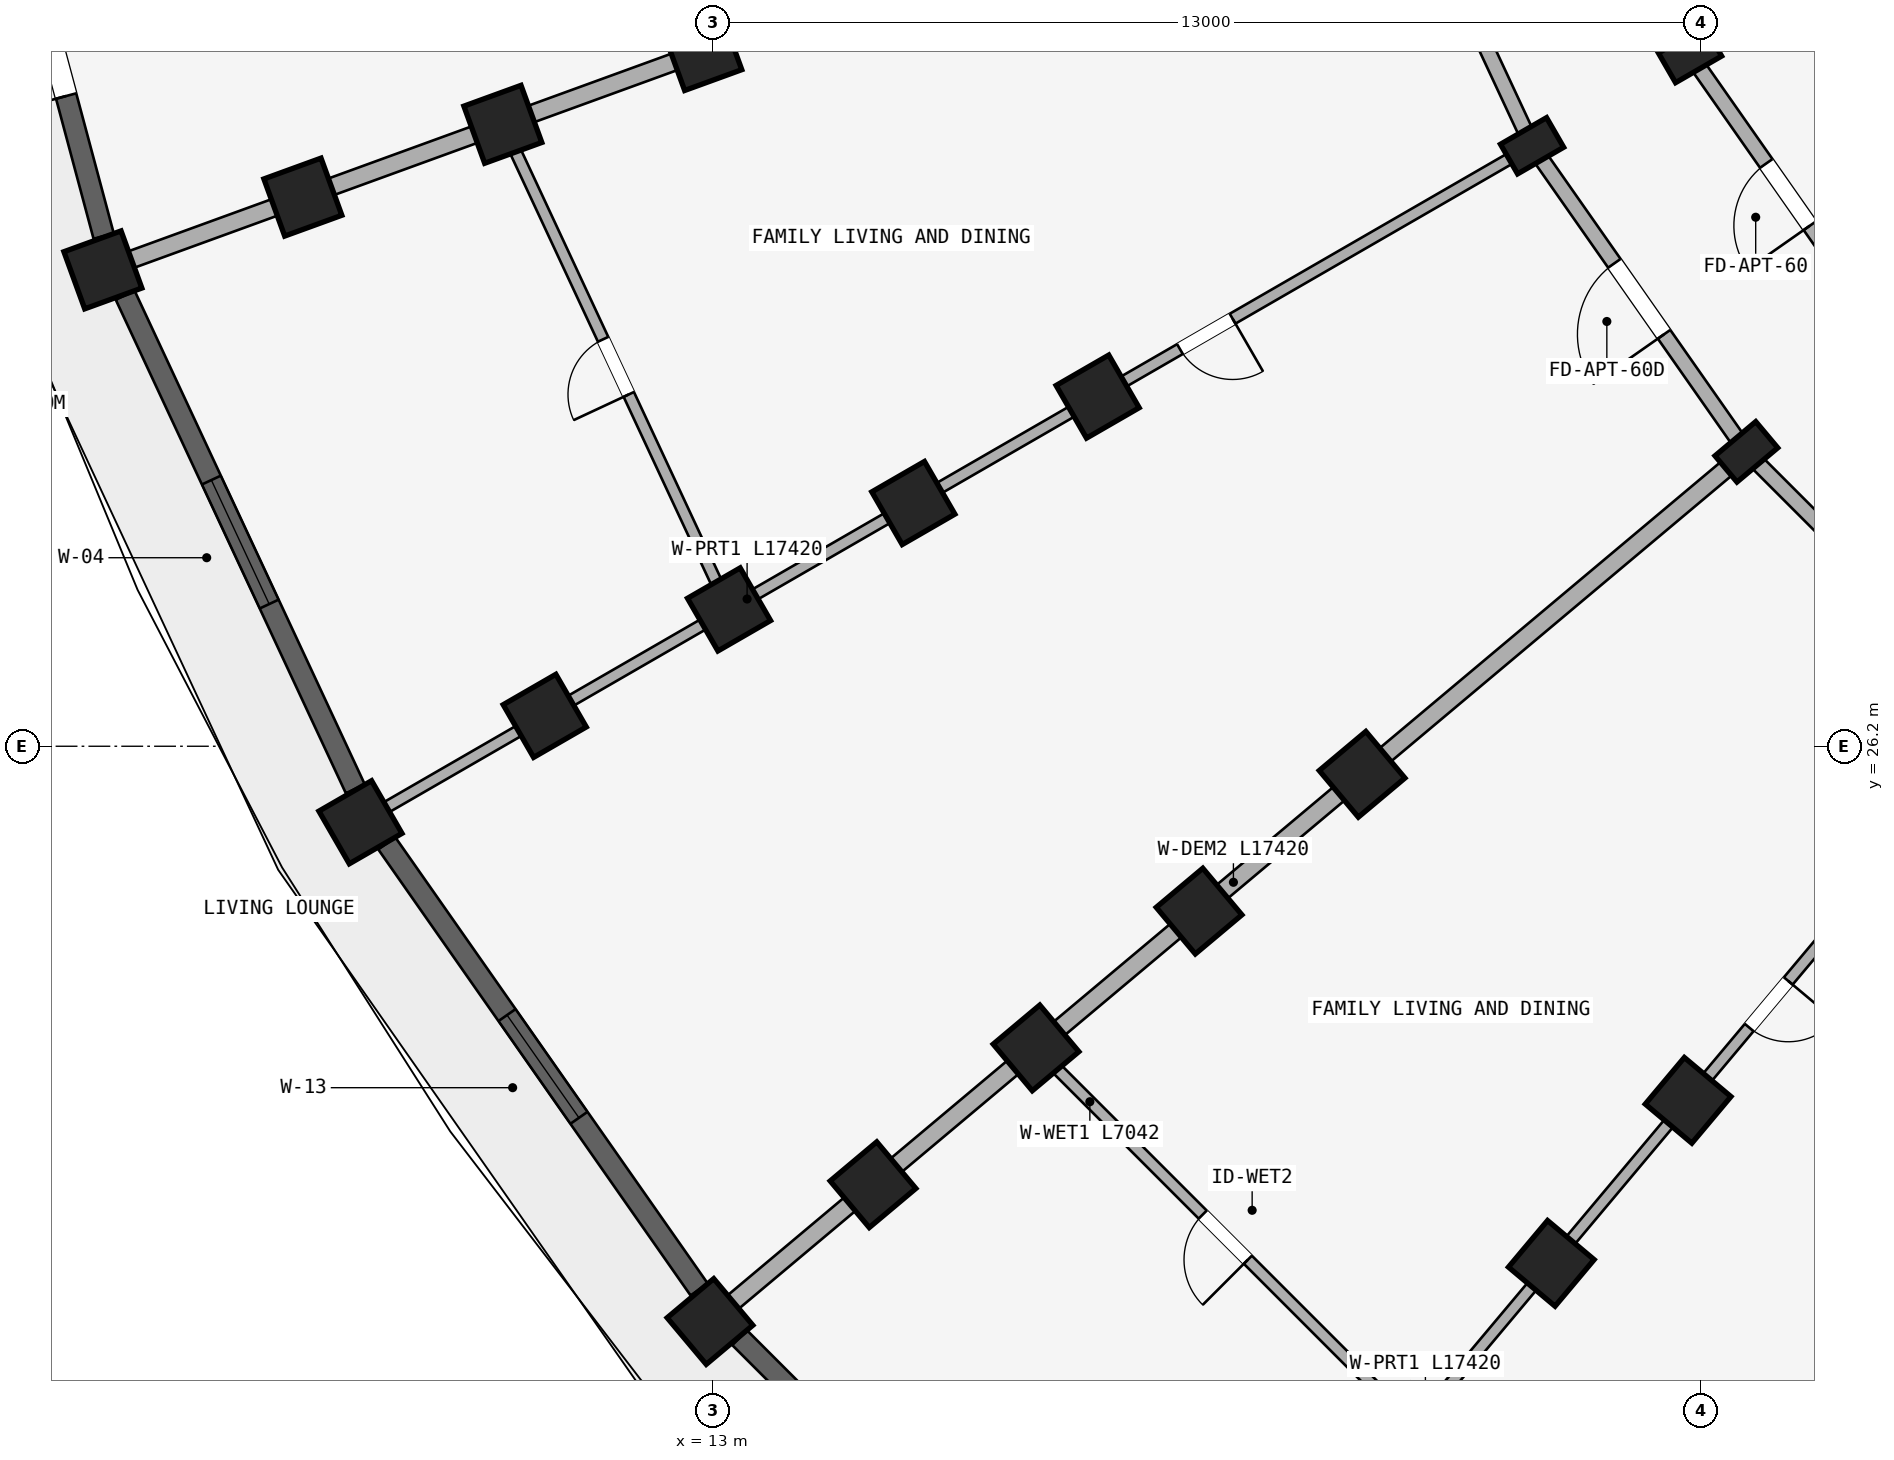
"""IFC4 building model, lengths in metres.
Left out: names, types, materials, properties, quantities, classifications, styles, units other than length and angle.
Written with IfcOpenShell. Run it as: python <this file> out.ifc"""

import sys

from ifc_helpers import new_model, si_unit, direction, frame, frame_2d, origin, origin_2d, place, context, subcontext, project, spatial, rectangle, extrude, element, fill, save


model = new_model("IFC4")
c1 = context("Model", 3, precision=1e-05, world=origin(), true_north=direction((0.0, 1.0)))
c2 = subcontext(c1, "Body", "Model", "MODEL_VIEW")
j1 = project(units=[si_unit("LENGTHUNIT", "METRE"), si_unit("PLANEANGLEUNIT", "RADIAN")], contexts=[c1])
p1 = place(None, origin())
s1 = spatial("IfcSite", under=j1, at=p1, CompositionType="ELEMENT")
p2 = place(p1, origin())
s2 = spatial("IfcBuilding", under=s1, at=p2, CompositionType="ELEMENT")
p3 = place(p2, frame((0.0, 0.0, 11.85)))
s3 = spatial("IfcBuildingStorey", under=s2, at=p3, CompositionType="ELEMENT", Elevation=11.85)
for number, where, z_axis, x_axis in (
    (1, (25.831, 21.542, 0.0), (0.0, 0.0, 1.0), (-0.766, 0.643, 0.0)),
    (2, (24.031, 19.397, 0.0), (0.0, 0.0, 1.0), (-0.766, 0.643, 0.0)),
):
    element("IfcColumn", number, at=place(p3, frame(where, z_axis=z_axis, x_axis=x_axis)), inside=s3, PredefinedType="COLUMN", context=c2, shape_type="SweptSolid", body=[
        extrude(rectangle(XDim=0.8, YDim=0.8, at=origin_2d()), origin(), (0.0, 0.0, 1.0), 2.93),
    ])
p4 = place(p3, frame((26.598, 30.073, 0.0), z_axis=(0.0, 0.0, 1.0), x_axis=(-0.642787609687, 0.766044443119, 0.0)))
e3 = element("IfcColumn", 3, at=p4, inside=s3, PredefinedType="COLUMN", context=c2, shape_type="SweptSolid", body=[
    extrude(rectangle(XDim=0.45, YDim=0.7, at=origin_2d()), origin(), (0.0, 0.0, 1.0), 2.93),
])
for number, where, z_axis, x_axis in (
    (4, (21.542, 25.831, 0.0), (0.0, 0.0, 1.0), (-0.643, 0.766, 0.0)),
    (5, (19.397, 24.031, 0.0), (0.0, 0.0, 1.0), (-0.643, 0.766, 0.0)),
    (6, (17.252, 22.231, 0.0), (0.0, 0.0, 1.0), (-0.643, 0.766, 0.0)),
    (7, (15.107, 20.432, 0.0), (0.0, 0.0, 1.0), (-0.643, 0.766, 0.0)),
    (8, (12.962, 18.632, 0.0), (0.0, 0.0, 1.0), (-0.643, 0.766, 0.0)),
):
    element("IfcColumn", number, at=place(p3, frame(where, z_axis=z_axis, x_axis=x_axis)), inside=s3, PredefinedType="COLUMN", context=c2, shape_type="SweptSolid", body=[
        extrude(rectangle(XDim=0.8, YDim=0.8, at=origin_2d()), origin(), (0.0, 0.0, 1.0), 2.93),
    ])
for number, where, z_axis, x_axis in (
    (9, (25.856, 35.3, 0.0), (0.0, 0.0, 1.0), (-0.5, 0.866, 0.0)),
    (10, (23.778, 34.1, 0.0), (0.0, 0.0, 1.0), (-0.5, 0.866, 0.0)),
):
    element("IfcColumn", number, at=place(p3, frame(where, z_axis=z_axis, x_axis=x_axis)), inside=s3, PredefinedType="COLUMN", context=c2, shape_type="SweptSolid", body=[
        extrude(rectangle(XDim=0.45, YDim=0.7, at=origin_2d()), origin(), (0.0, 0.0, 1.0), 2.93),
    ])
for number, where, z_axis, x_axis in (
    (11, (18.062, 30.8, 0.0), (0.0, 0.0, 1.0), (-0.5, 0.866, 0.0)),
    (12, (15.637, 29.4, 0.0), (0.0, 0.0, 1.0), (-0.5, 0.866, 0.0)),
    (13, (13.213, 28.0, 0.0), (0.0, 0.0, 1.0), (-0.5, 0.866, 0.0)),
    (14, (10.788, 26.6, 0.0), (0.0, 0.0, 1.0), (-0.5, 0.866, 0.0)),
    (15, (8.363, 25.2, 0.0), (0.0, 0.0, 1.0), (-0.5, 0.866, 0.0)),
    (16, (12.868, 35.34, 0.0), (0.0, 0.0, 1.0), (-0.342, 0.94, 0.0)),
    (17, (10.236, 34.382, 0.0), (0.0, 0.0, 1.0), (-0.342, 0.94, 0.0)),
    (18, (7.605, 33.425, 0.0), (0.0, 0.0, 1.0), (-0.342, 0.94, 0.0)),
    (19, (4.974, 32.467, 0.0), (0.0, 0.0, 1.0), (-0.342, 0.94, 0.0)),
):
    element("IfcColumn", number, at=place(p3, frame(where, z_axis=z_axis, x_axis=x_axis)), inside=s3, PredefinedType="COLUMN", context=c2, shape_type="SweptSolid", body=[
        extrude(rectangle(XDim=0.8, YDim=0.8, at=origin_2d()), origin(), (0.0, 0.0, 1.0), 2.93),
    ])
p5 = place(p3, frame((30.073, 26.598, 0.0), z_axis=(0.0, 0.0, 1.0), x_axis=(-0.707106781187, 0.707106781187, 0.0)))
e20 = element("IfcWall", 20, at=p5, inside=s3, PredefinedType="STANDARD", context=c2, shape_type="SweptSolid", body=[
    extrude(rectangle(XDim=4.916, YDim=0.2, at=frame_2d((2.458, 0.0))), origin(), (0.0, 0.0, 1.0), 2.372),
])
p6 = place(p3, frame((28.436, 31.616, 0.0), z_axis=(0.0, 0.0, 1.0), x_axis=(-0.573571637217, 0.819155404658, 0.0)))
e21 = element("IfcWall", 21, at=p6, inside=s3, PredefinedType="STANDARD", context=c2, shape_type="SweptSolid", body=[
    extrude(rectangle(XDim=4.497, YDim=0.2, at=frame_2d((2.249, 0.0))), origin(), (0.0, 0.0, 1.0), 2.372),
])
p7 = place(p6, frame((1.749, 0.0, 0.0)))
e22 = element("IfcOpeningElement", 22, at=p7, cuts=e21, PredefinedType="OPENING", context=c2, shape_type="SweptSolid", body=[
    extrude(rectangle(XDim=1.0, YDim=2.15, at=frame_2d((0.5, 1.075))), frame((0.0, 0.11, 0.0), z_axis=(0.0, -1.0, 0.0), x_axis=(1.0, 0.0, 0.0)), (0.0, 0.0, 1.0), 0.22),
])
p8 = place(p3, frame((26.598, 30.073, 0.0), z_axis=(0.0, 0.0, 1.0), x_axis=(-0.573592335331, 0.819140911474, 0.0)))
e23 = element("IfcWall", 23, at=p8, inside=s3, PredefinedType="STANDARD", context=c2, shape_type="SweptSolid", body=[
    extrude(rectangle(XDim=4.916, YDim=0.2, at=frame_2d((2.458, 0.0))), origin(), (0.0, 0.0, 1.0), 2.372),
])
p9 = place(p8, frame((1.888, 0.0, 0.0)))
e24 = element("IfcOpeningElement", 24, at=p9, cuts=e23, PredefinedType="OPENING", context=c2, shape_type="SweptSolid", body=[
    extrude(rectangle(XDim=1.14, YDim=2.15, at=frame_2d((0.57, 1.075))), frame((0.0, 0.11, 0.0), z_axis=(0.0, -1.0, 0.0), x_axis=(1.0, 0.0, 0.0)), (0.0, 0.0, 1.0), 0.22),
])
p10 = place(p3, frame((25.856, 35.3, 0.0), z_axis=(0.0, 0.0, 1.0), x_axis=(-0.422617978463, 0.906307919131, 0.0)))
e25 = element("IfcWall", 25, at=p10, inside=s3, PredefinedType="STANDARD", context=c2, shape_type="SweptSolid", body=[
    extrude(rectangle(XDim=4.497, YDim=0.2, at=frame_2d((2.249, 0.0))), origin(), (0.0, 0.0, 1.0), 2.372),
])
p11 = place(p3, frame((23.778, 34.1, 0.0), z_axis=(0.0, 0.0, 1.0), x_axis=(-0.422629854778, 0.906302381024, 0.0)))
e26 = element("IfcWall", 26, at=p11, inside=s3, PredefinedType="STANDARD", context=c2, shape_type="SweptSolid", body=[
    extrude(rectangle(XDim=4.915, YDim=0.2, at=frame_2d((2.458, 0.0))), origin(), (0.0, 0.0, 1.0), 2.372),
])
p12 = place(p3, frame((34.05, 23.691, 0.0), z_axis=(0.0, 0.0, 1.0), x_axis=(-0.499997843263, -0.866026648973, 0.0)))
e27 = element("IfcWall", 27, at=p12, inside=s3, PredefinedType="STANDARD", context=c2, shape_type="SweptSolid", body=[
    extrude(rectangle(XDim=17.42, YDim=0.23, at=frame_2d((8.71, 0.0))), origin(), (0.0, 0.0, 1.0), 2.372),
])
p13 = place(p3, frame((30.009, 26.521, 0.0), z_axis=(0.0, 0.0, 1.0), x_axis=(-0.642784757967, -0.766046835987, 0.0)))
e28 = element("IfcWall", 28, at=p13, inside=s3, PredefinedType="PARTITIONING", context=c2, shape_type="SweptSolid", body=[
    extrude(rectangle(XDim=17.42, YDim=0.15, at=frame_2d((8.71, 0.0))), origin(), (0.0, 0.0, 1.0), 2.372),
])
p14 = place(p13, frame((4.45, 0.0, 0.0)))
e29 = element("IfcOpeningElement", 29, at=p14, cuts=e28, PredefinedType="OPENING", context=c2, shape_type="SweptSolid", body=[
    extrude(rectangle(XDim=0.8, YDim=2.1, at=frame_2d((0.4, 1.05))), frame((0.0, 0.085, 0.0), z_axis=(0.0, -1.0, 0.0), x_axis=(1.0, 0.0, 0.0)), (0.0, 0.0, 1.0), 0.17),
])
p15 = place(p3, frame((26.521, 30.009, 0.0), z_axis=(0.0, 0.0, 1.0), x_axis=(-0.766046835987, -0.642784757967, 0.0)))
e30 = element("IfcWall", 30, at=p15, inside=s3, PredefinedType="STANDARD", context=c2, shape_type="SweptSolid", body=[
    extrude(rectangle(XDim=17.42, YDim=0.23, at=frame_2d((8.71, 0.0))), origin(), (0.0, 0.0, 1.0), 2.372),
])
p16 = place(p3, frame((31.746, 38.7, 0.0), z_axis=(0.0, 0.0, 1.0), x_axis=(-0.866026575979, -0.499997969693, 0.0)))
e31 = element("IfcWall", 31, at=p16, inside=s3, PredefinedType="PARTITIONING", context=c2, shape_type="SweptSolid", body=[
    extrude(rectangle(XDim=6.75, YDim=0.15, at=frame_2d((3.375, 0.0))), origin(), (0.0, 0.0, 1.0), 2.372),
])
p17 = place(p16, frame((3.242, 0.0, 0.0)))
e32 = element("IfcOpeningElement", 32, at=p17, cuts=e31, PredefinedType="OPENING", context=c2, shape_type="SweptSolid", body=[
    extrude(rectangle(XDim=0.94, YDim=2.1, at=frame_2d((0.47, 1.05))), frame((0.0, 0.085, 0.0), z_axis=(0.0, -1.0, 0.0), x_axis=(1.0, 0.0, 0.0)), (0.0, 0.0, 1.0), 0.17),
])
p18 = place(p3, frame((23.691, 34.05, 0.0), z_axis=(0.0, 0.0, 1.0), x_axis=(-0.866026648973, -0.499997843263, 0.0)))
e33 = element("IfcWall", 33, at=p18, inside=s3, PredefinedType="PARTITIONING", context=c2, shape_type="SweptSolid", body=[
    extrude(rectangle(XDim=17.42, YDim=0.15, at=frame_2d((8.71, 0.0))), origin(), (0.0, 0.0, 1.0), 2.372),
])
p19 = place(p18, frame((4.45, 0.0, 0.0)))
e34 = element("IfcOpeningElement", 34, at=p19, cuts=e33, PredefinedType="OPENING", context=c2, shape_type="SweptSolid", body=[
    extrude(rectangle(XDim=0.8, YDim=2.1, at=frame_2d((0.4, 1.05))), frame((0.0, 0.085, 0.0), z_axis=(0.0, -1.0, 0.0), x_axis=(1.0, 0.0, 0.0)), (0.0, 0.0, 1.0), 0.17),
])
p20 = place(p3, frame((21.607, 38.521, 0.0), z_axis=(0.0, 0.0, 1.0), x_axis=(-0.939691901159, -0.342022120477, 0.0)))
e35 = element("IfcWall", 35, at=p20, inside=s3, PredefinedType="STANDARD", context=c2, shape_type="SweptSolid", body=[
    extrude(rectangle(XDim=17.42, YDim=0.23, at=frame_2d((8.71, 0.0))), origin(), (0.0, 0.0, 1.0), 2.372),
])
p21 = place(p3, frame((22.231, 17.252, 0.0), z_axis=(0.0, 0.0, 1.0), x_axis=(-0.707106781187, 0.707106781187, 0.0)))
e36 = element("IfcWall", 36, at=p21, inside=s3, PredefinedType="PLUMBINGWALL", context=c2, shape_type="SweptSolid", body=[
    extrude(rectangle(XDim=7.042, YDim=0.15, at=frame_2d((3.521, 0.0))), origin(), (0.0, 0.0, 1.0), 2.372),
])
p22 = place(p21, frame((3.101, 0.0, 0.0)))
e37 = element("IfcOpeningElement", 37, at=p22, cuts=e36, PredefinedType="OPENING", context=c2, shape_type="SweptSolid", body=[
    extrude(rectangle(XDim=0.84, YDim=2.1, at=frame_2d((0.42, 1.05))), frame((0.0, 0.085, 0.0), z_axis=(0.0, -1.0, 0.0), x_axis=(1.0, 0.0, 0.0)), (0.0, 0.0, 1.0), 0.17),
])
p23 = place(p3, frame((13.213, 28.0, 0.0), z_axis=(0.0, 0.0, 1.0), x_axis=(-0.422640621205, 0.906297360311, 0.0)))
e38 = element("IfcWall", 38, at=p23, inside=s3, PredefinedType="PLUMBINGWALL", context=c2, shape_type="SweptSolid", body=[
    extrude(rectangle(XDim=7.042, YDim=0.15, at=frame_2d((3.521, 0.0))), origin(), (0.0, 0.0, 1.0), 2.372),
])
p24 = place(p23, frame((3.121, 0.0, 0.0)))
e39 = element("IfcOpeningElement", 39, at=p24, cuts=e38, PredefinedType="OPENING", context=c2, shape_type="SweptSolid", body=[
    extrude(rectangle(XDim=0.8, YDim=2.1, at=frame_2d((0.4, 1.05))), frame((0.0, 0.085, 0.0), z_axis=(0.0, -1.0, 0.0), x_axis=(1.0, 0.0, 0.0)), (0.0, 0.0, 1.0), 0.17),
])
p25 = place(p3, frame((18.418, 13.352, 0.0), z_axis=(0.0, 0.0, 1.0), x_axis=(-0.707106781187, 0.707106781187, 0.0)))
e40 = element("IfcWall", 40, at=p25, inside=s3, PredefinedType="STANDARD", context=c2, shape_type="SweptSolid", body=[
    extrude(rectangle(XDim=7.164, YDim=0.275, at=frame_2d((3.582, 0.0))), origin(), (0.0, 0.0, 1.0), 2.372),
])
p26 = place(p25, frame((4.69, 0.0, 0.522)))
e41 = element("IfcOpeningElement", 41, at=p26, cuts=e40, PredefinedType="OPENING", context=c2, shape_type="SweptSolid", body=[
    extrude(rectangle(XDim=1.2, YDim=1.5, at=frame_2d((0.6, 0.75))), frame((0.0, 0.147, 0.0), z_axis=(0.0, -1.0, 0.0), x_axis=(1.0, 0.0, 0.0)), (0.0, 0.0, 1.0), 0.295),
])
p27 = place(p25, frame((1.907, 0.0, 0.0)))
e42 = element("IfcOpeningElement", 42, at=p27, cuts=e40, PredefinedType="OPENING", context=c2, shape_type="SweptSolid", body=[
    extrude(rectangle(XDim=1.2, YDim=2.15, at=frame_2d((0.6, 1.075))), frame((0.0, 0.147, 0.0), z_axis=(0.0, -1.0, 0.0), x_axis=(1.0, 0.0, 0.0)), (0.0, 0.0, 1.0), 0.295),
])
p28 = place(p3, frame((12.819, 19.053, 0.0), z_axis=(0.0, 0.0, 1.0), x_axis=(-0.573562972382, 0.819161471697, 0.0)))
e43 = element("IfcWall", 43, at=p28, inside=s3, PredefinedType="STANDARD", context=c2, shape_type="SweptSolid", body=[
    extrude(rectangle(XDim=7.164, YDim=0.275, at=frame_2d((3.582, 0.0))), origin(), (0.0, 0.0, 1.0), 2.372),
])
p29 = place(p28, frame((2.757, 0.0, 0.422)))
e44 = element("IfcOpeningElement", 44, at=p29, cuts=e43, PredefinedType="OPENING", context=c2, shape_type="SweptSolid", body=[
    extrude(rectangle(XDim=1.65, YDim=1.75, at=frame_2d((0.825, 0.875))), frame((0.0, 0.147, 0.0), z_axis=(0.0, -1.0, 0.0), x_axis=(1.0, 0.0, 0.0)), (0.0, 0.0, 1.0), 0.295),
])
p30 = place(p3, frame((8.296, 25.64, 0.0), z_axis=(0.0, 0.0, 1.0), x_axis=(-0.422633596215, 0.906300636296, 0.0)))
e45 = element("IfcWall", 45, at=p30, inside=s3, PredefinedType="STANDARD", context=c2, shape_type="SweptSolid", body=[
    extrude(rectangle(XDim=7.164, YDim=0.275, at=frame_2d((3.582, 0.0))), origin(), (0.0, 0.0, 1.0), 2.372),
])
p31 = place(p30, frame((2.682, 0.0, 0.522)))
e46 = element("IfcOpeningElement", 46, at=p31, cuts=e45, PredefinedType="OPENING", context=c2, shape_type="SweptSolid", body=[
    extrude(rectangle(XDim=1.8, YDim=1.65, at=frame_2d((0.9, 0.825))), frame((0.0, 0.147, 0.0), z_axis=(0.0, -1.0, 0.0), x_axis=(1.0, 0.0, 0.0)), (0.0, 0.0, 1.0), 0.295),
])
p32 = place(p3, frame((4.984, 32.912, 0.0), z_axis=(0.0, 0.0, 1.0), x_axis=(-0.258826933296, 0.965923712619, 0.0)))
e47 = element("IfcWall", 47, at=p32, inside=s3, PredefinedType="STANDARD", context=c2, shape_type="SweptSolid", body=[
    extrude(rectangle(XDim=7.164, YDim=0.275, at=frame_2d((3.582, 0.0))), origin(), (0.0, 0.0, 1.0), 2.372),
])
p33 = place(p32, frame((4.69, 0.0, 0.372)))
e48 = element("IfcOpeningElement", 48, at=p33, cuts=e47, PredefinedType="OPENING", context=c2, shape_type="SweptSolid", body=[
    extrude(rectangle(XDim=1.2, YDim=1.5, at=frame_2d((0.6, 0.75))), frame((0.0, 0.147, 0.0), z_axis=(0.0, -1.0, 0.0), x_axis=(1.0, 0.0, 0.0)), (0.0, 0.0, 1.0), 0.295),
])
p34 = place(p32, frame((1.907, 0.0, 0.0)))
e49 = element("IfcOpeningElement", 49, at=p34, cuts=e47, PredefinedType="OPENING", context=c2, shape_type="SweptSolid", body=[
    extrude(rectangle(XDim=1.2, YDim=2.15, at=frame_2d((0.6, 1.075))), frame((0.0, 0.147, 0.0), z_axis=(0.0, -1.0, 0.0), x_axis=(1.0, 0.0, 0.0)), (0.0, 0.0, 1.0), 0.295),
])
p35 = place(p29, origin())
e50 = element("IfcWindow", 50, at=p35, inside=s3, PartitioningType="DOUBLE_PANEL_VERTICAL", PredefinedType="WINDOW", context=c2, shape_type="SweptSolid", body=[
    extrude(rectangle(XDim=1.65, YDim=1.75, at=frame_2d((0.825, 0.875))), frame((0.0, 0.03, 0.0), z_axis=(0.0, -1.0, 0.0), x_axis=(1.0, 0.0, 0.0)), (0.0, 0.0, 1.0), 0.06),
])
fill(e44, e50)
p36 = place(p31, origin())
e51 = element("IfcWindow", 51, at=p36, inside=s3, PartitioningType="DOUBLE_PANEL_VERTICAL", PredefinedType="WINDOW", context=c2, shape_type="SweptSolid", body=[
    extrude(rectangle(XDim=1.8, YDim=1.65, at=frame_2d((0.9, 0.825))), frame((0.0, 0.03, 0.0), z_axis=(0.0, -1.0, 0.0), x_axis=(1.0, 0.0, 0.0)), (0.0, 0.0, 1.0), 0.06),
])
fill(e46, e51)
p37 = place(p14, frame((0.8, 0.0, 0.0), z_axis=(0.0, 0.0, 1.0), x_axis=(-1.0, 0.0, 0.0)))
e52 = element("IfcDoor", 52, at=p37, inside=s3, OperationType="SINGLE_SWING_RIGHT", PredefinedType="DOOR", context=c2, shape_type="SweptSolid", body=[
    extrude(rectangle(XDim=0.8, YDim=2.1, at=frame_2d((0.4, 1.05))), frame((0.0, 0.025, 0.0), z_axis=(0.0, -1.0, 0.0), x_axis=(1.0, 0.0, 0.0)), (0.0, 0.0, 1.0), 0.05),
])
fill(e29, e52)
p38 = place(p19, frame((0.8, 0.0, 0.0), z_axis=(0.0, 0.0, 1.0), x_axis=(-1.0, 0.0, 0.0)))
e53 = element("IfcDoor", 53, at=p38, inside=s3, OperationType="SINGLE_SWING_RIGHT", PredefinedType="DOOR", context=c2, shape_type="SweptSolid", body=[
    extrude(rectangle(XDim=0.8, YDim=2.1, at=frame_2d((0.4, 1.05))), frame((0.0, 0.025, 0.0), z_axis=(0.0, -1.0, 0.0), x_axis=(1.0, 0.0, 0.0)), (0.0, 0.0, 1.0), 0.05),
])
fill(e34, e53)
p39 = place(p22, origin())
e54 = element("IfcDoor", 54, at=p39, inside=s3, OperationType="SINGLE_SWING_LEFT", PredefinedType="DOOR", context=c2, shape_type="SweptSolid", body=[
    extrude(rectangle(XDim=0.84, YDim=2.1, at=frame_2d((0.42, 1.05))), frame((0.0, 0.025, 0.0), z_axis=(0.0, -1.0, 0.0), x_axis=(1.0, 0.0, 0.0)), (0.0, 0.0, 1.0), 0.05),
])
fill(e37, e54)
p40 = place(p9, frame((1.14, 0.0, 0.0), z_axis=(0.0, 0.0, 1.0), x_axis=(-1.0, 0.0, 0.0)))
e55 = element("IfcDoor", 55, at=p40, inside=s3, OperationType="SINGLE_SWING_RIGHT", PredefinedType="DOOR", context=c2, shape_type="SweptSolid", body=[
    extrude(rectangle(XDim=1.14, YDim=2.15, at=frame_2d((0.57, 1.075))), frame((0.0, 0.025, 0.0), z_axis=(0.0, -1.0, 0.0), x_axis=(1.0, 0.0, 0.0)), (0.0, 0.0, 1.0), 0.05),
])
fill(e24, e55)
p41 = place(p24, origin())
e56 = element("IfcDoor", 56, at=p41, inside=s3, OperationType="SINGLE_SWING_LEFT", PredefinedType="DOOR", context=c2, shape_type="SweptSolid", body=[
    extrude(rectangle(XDim=0.8, YDim=2.1, at=frame_2d((0.4, 1.05))), frame((0.0, 0.025, 0.0), z_axis=(0.0, -1.0, 0.0), x_axis=(1.0, 0.0, 0.0)), (0.0, 0.0, 1.0), 0.05),
])
fill(e39, e56)
p42 = place(p7, frame((1.0, 0.0, 0.0), z_axis=(0.0, 0.0, 1.0), x_axis=(-1.0, 0.0, 0.0)))
e57 = element("IfcDoor", 57, at=p42, inside=s3, OperationType="SINGLE_SWING_RIGHT", PredefinedType="DOOR", context=c2, shape_type="SweptSolid", body=[
    extrude(rectangle(XDim=1.0, YDim=2.15, at=frame_2d((0.5, 1.075))), frame((0.0, 0.025, 0.0), z_axis=(0.0, -1.0, 0.0), x_axis=(1.0, 0.0, 0.0)), (0.0, 0.0, 1.0), 0.05),
])
fill(e22, e57)
p43 = place(p34, origin())
e58 = element("IfcDoor", 58, at=p43, inside=s3, OperationType="SINGLE_SWING_LEFT", PredefinedType="DOOR", context=c2, shape_type="SweptSolid", body=[
    extrude(rectangle(XDim=1.2, YDim=2.15, at=frame_2d((0.6, 1.075))), frame((0.0, 0.025, 0.0), z_axis=(0.0, -1.0, 0.0), x_axis=(1.0, 0.0, 0.0)), (0.0, 0.0, 1.0), 0.05),
])
fill(e49, e58)
save(model, sys.argv[1])
